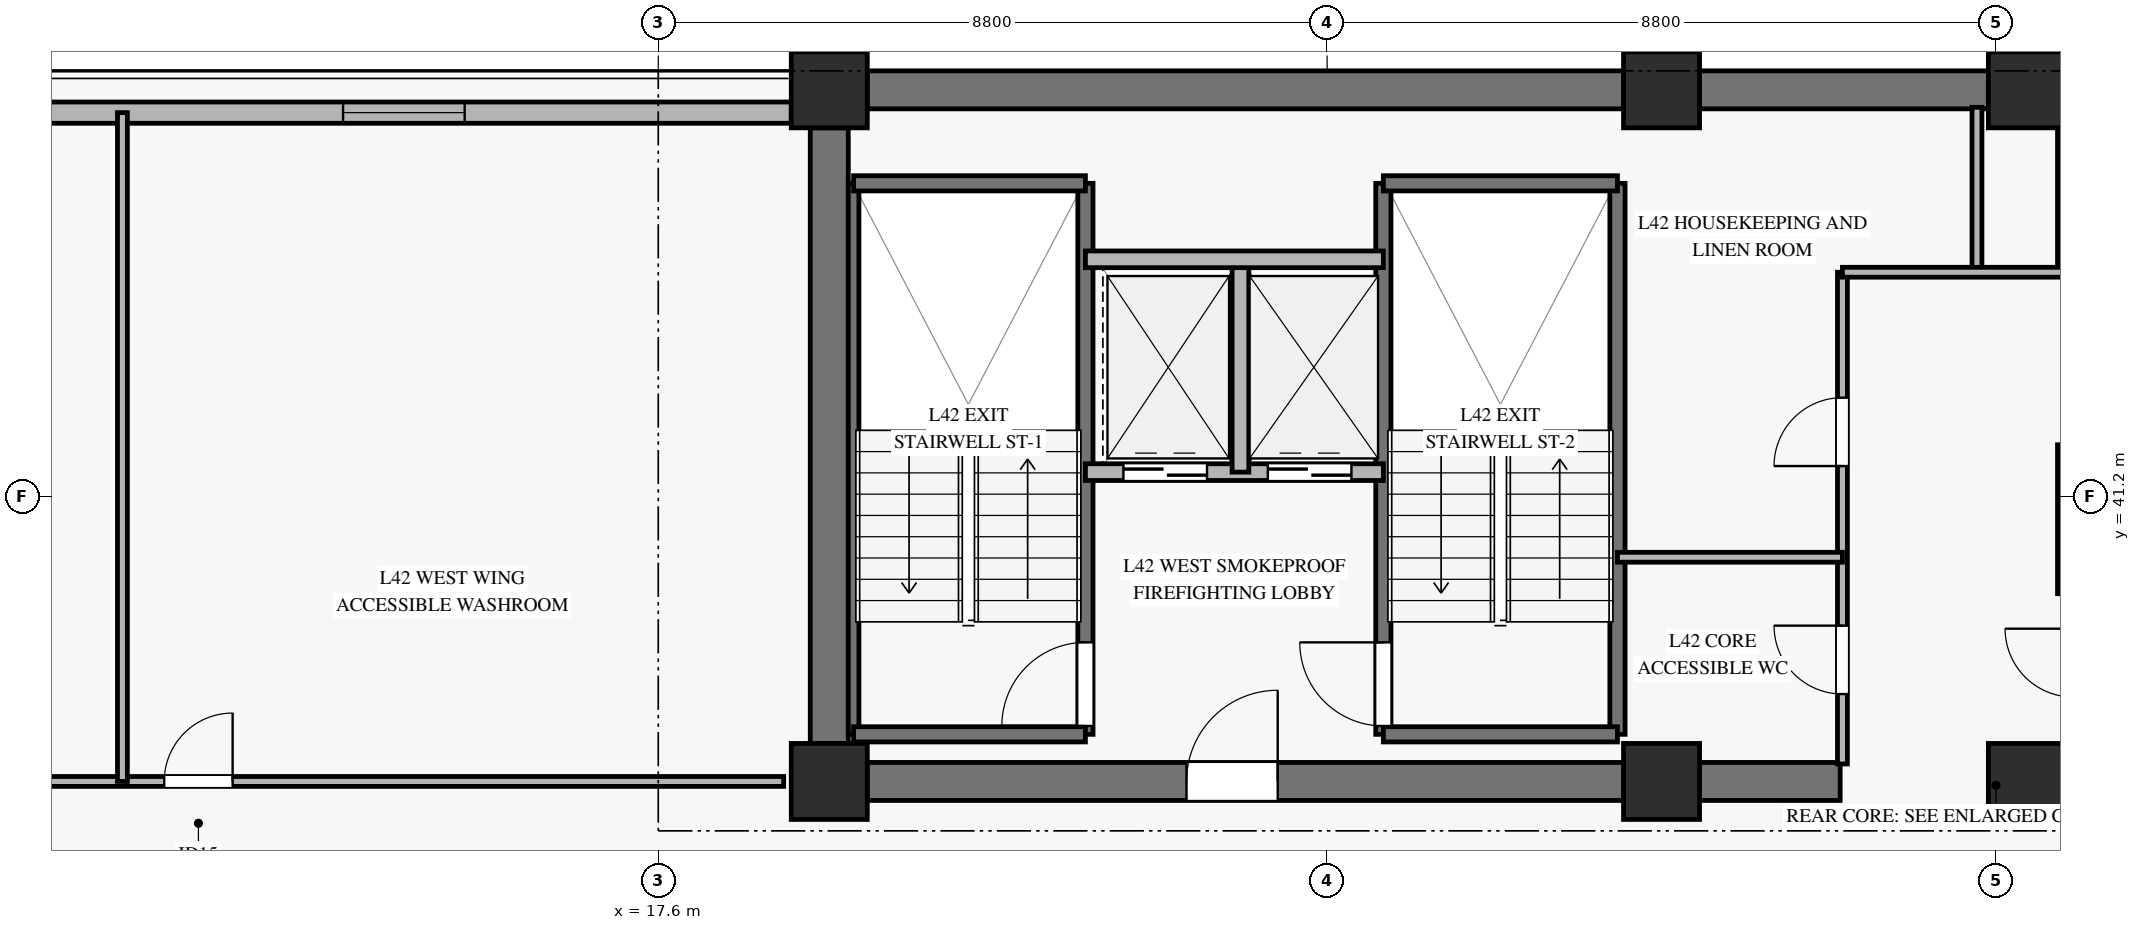
"""IFC4 building model, lengths in metres.
Left out: names, types, materials, properties, quantities, classifications, styles, units other than length and angle.
Written with IfcOpenShell. Run it as: python <this file> out.ifc"""

import sys

from ifc_helpers import new_model, si_unit, direction, frame, frame_2d, origin, origin_2d, place, context, subcontext, project, spatial, rectangle, extrude, source, transform, mapped, element, fill, save


model = new_model("IFC4")
c1 = context("Model", 3, precision=1e-05, world=origin(), true_north=direction((0.0, 1.0)))
c2 = subcontext(c1, "Body", "Model", "MODEL_VIEW")
j1 = project(units=[si_unit("LENGTHUNIT", "METRE"), si_unit("PLANEANGLEUNIT", "RADIAN")], contexts=[c1])
p1 = place(None, origin())
s1 = spatial("IfcSite", under=j1, at=p1, CompositionType="ELEMENT")
p2 = place(p1, origin())
s2 = spatial("IfcBuilding", under=s1, at=p2, CompositionType="ELEMENT")
p3 = place(p2, frame((0.0, 0.0, 170.2)))
s3 = spatial("IfcBuildingStorey", under=s2, at=p3, CompositionType="ELEMENT", Elevation=170.2)
m1 = source(origin(), c2, "Body", "SweptSolid", [
    extrude(rectangle(XDim=1.0, YDim=1.0, at=origin_2d()), origin(), (0.0, 0.0, 1.0), 3.27),
])
for number, where, z_axis, x_axis in (
    (1, (19.85, 37.45, 0.0), (0.0, 0.0, 1.0), (1.0, 0.0, 0.0)),
    (2, (19.85, 46.55, 0.0), (0.0, 0.0, 1.0), (1.0, 0.0, 0.0)),
    (3, (30.8, 37.45, 0.0), (0.0, 0.0, 1.0), (1.0, 0.0, 0.0)),
    (4, (30.8, 46.55, 0.0), (0.0, 0.0, 1.0), (1.0, 0.0, 0.0)),
    (5, (35.6, 37.45, 0.0), (0.0, 0.0, 1.0), (1.0, 0.0, 0.0)),
    (6, (35.6, 46.55, 0.0), (0.0, 0.0, 1.0), (1.0, 0.0, 0.0)),
):
    element("IfcColumn", number, at=place(p3, frame(where, z_axis=z_axis, x_axis=x_axis)), inside=s3, PredefinedType="PILASTER", context=c2, shape_type="MappedRepresentation", body=[
        mapped(m1, transform((0.0, 0.0, 0.0), x_axis=(1.0, 0.0, 0.0), y_axis=(0.0, 1.0, 0.0), z_axis=(0.0, 0.0, 1.0), scale=1.0)),
    ])
p4 = place(p3, frame((20.35, 46.55, 0.0), z_axis=(0.0, 0.0, 1.0), x_axis=(1.0, 0.0, 0.0)))
e7 = element("IfcWall", 7, at=p4, inside=s3, PredefinedType="SHEAR", context=c2, shape_type="SweptSolid", body=[
    extrude(rectangle(XDim=9.95, YDim=0.5, at=frame_2d((4.975, 0.0))), origin(), (0.0, 0.0, 1.0), 3.27),
])
p5 = place(p3, frame((31.3, 46.55, 0.0), z_axis=(0.0, 0.0, 1.0), x_axis=(1.0, 0.0, 0.0)))
e8 = element("IfcWall", 8, at=p5, inside=s3, PredefinedType="SHEAR", context=c2, shape_type="SweptSolid", body=[
    extrude(rectangle(XDim=3.8, YDim=0.5, at=frame_2d((1.9, 0.0))), origin(), (0.0, 0.0, 1.0), 3.27),
])
p6 = place(p3, frame((20.35, 37.45, 0.0), z_axis=(0.0, 0.0, 1.0), x_axis=(1.0, 0.0, 0.0)))
e9 = element("IfcWall", 9, at=p6, inside=s3, PredefinedType="SHEAR", context=c2, shape_type="SweptSolid", body=[
    extrude(rectangle(XDim=9.95, YDim=0.5, at=frame_2d((4.975, 0.0))), origin(), (0.0, 0.0, 1.0), 3.27),
])
p7 = place(p6, frame((4.2, 0.0, 0.0)))
e10 = element("IfcOpeningElement", 10, at=p7, cuts=e9, PredefinedType="OPENING", context=c2, shape_type="SweptSolid", body=[
    extrude(rectangle(XDim=1.2, YDim=2.15, at=frame_2d((0.6, 1.075))), frame((0.0, 0.26, 0.0), z_axis=(0.0, -1.0, 0.0), x_axis=(1.0, 0.0, 0.0)), (0.0, 0.0, 1.0), 0.52),
])
p8 = place(p3, frame((31.3, 37.45, 0.0), z_axis=(0.0, 0.0, 1.0), x_axis=(1.0, 0.0, 0.0)))
e11 = element("IfcWall", 11, at=p8, inside=s3, PredefinedType="SHEAR", context=c2, shape_type="SweptSolid", body=[
    extrude(rectangle(XDim=1.85, YDim=0.5, at=frame_2d((0.925, 0.0))), origin(), (0.0, 0.0, 1.0), 3.27),
])
p9 = place(p3, frame((19.85, 37.95, 0.0), z_axis=(0.0, 0.0, 1.0), x_axis=(0.0, 1.0, 0.0)))
e12 = element("IfcWall", 12, at=p9, inside=s3, PredefinedType="SHEAR", context=c2, shape_type="SweptSolid", body=[
    extrude(rectangle(XDim=8.1, YDim=0.5, at=frame_2d((4.05, 0.0))), origin(), (0.0, 0.0, 1.0), 3.27),
])
p10 = place(p3, frame((9.156, 46.25, 0.0), z_axis=(0.0, 0.0, 1.0), x_axis=(1.0, 0.0, 0.0)))
e13 = element("IfcWall", 13, at=p10, inside=s3, PredefinedType="SOLIDWALL", context=c2, shape_type="SweptSolid", body=[
    extrude(rectangle(XDim=10.194, YDim=0.28, at=frame_2d((5.097, 0.0))), origin(), (0.0, 0.0, 1.0), 2.75),
])
p11 = place(p10, frame((4.297, 0.0, 0.45)))
e14 = element("IfcOpeningElement", 14, at=p11, cuts=e13, PredefinedType="OPENING", context=c2, shape_type="SweptSolid", body=[
    extrude(rectangle(XDim=1.6, YDim=2.0, at=frame_2d((0.8, 1.0))), frame((0.0, 0.15, 0.0), z_axis=(0.0, -1.0, 0.0), x_axis=(1.0, 0.0, 0.0)), (0.0, 0.0, 1.0), 0.3),
])
p12 = place(p3, frame((20.17, 38.07, 0.0), z_axis=(0.0, 0.0, 1.0), x_axis=(0.0, 1.0, 0.0)))
e15 = element("IfcWall", 15, at=p12, inside=s3, PredefinedType="SOLIDWALL", context=c2, shape_type="SweptSolid", body=[
    extrude(rectangle(XDim=7.25, YDim=0.14, at=frame_2d((3.625, 0.0))), origin(), (0.0, 0.0, 1.0), 3.5),
])
p13 = place(p3, frame((23.22, 38.07, 0.0), z_axis=(0.0, 0.0, 1.0), x_axis=(0.0, 1.0, 0.0)))
e16 = element("IfcWall", 16, at=p13, inside=s3, PredefinedType="SOLIDWALL", context=c2, shape_type="SweptSolid", body=[
    extrude(rectangle(XDim=7.25, YDim=0.2, at=frame_2d((3.625, 0.0))), origin(), (0.0, 0.0, 1.0), 3.5),
])
p14 = place(p13, frame((0.11, 0.0, 0.0)))
e17 = element("IfcOpeningElement", 17, at=p14, cuts=e16, PredefinedType="OPENING", context=c2, shape_type="SweptSolid", body=[
    extrude(rectangle(XDim=1.1, YDim=2.15, at=frame_2d((0.55, 1.075))), frame((0.0, 0.11, 0.0), z_axis=(0.0, -1.0, 0.0), x_axis=(1.0, 0.0, 0.0)), (0.0, 0.0, 1.0), 0.22),
])
for number, where, z_axis, x_axis in (
    (18, (20.17, 45.32, 0.0), (0.0, 0.0, 1.0), (1.0, 0.0, 0.0)),
    (19, (20.17, 38.07, 0.0), (0.0, 0.0, 1.0), (1.0, 0.0, 0.0)),
):
    element("IfcWall", number, at=place(p3, frame(where, z_axis=z_axis, x_axis=x_axis)), inside=s3, PredefinedType="SOLIDWALL", context=c2, shape_type="SweptSolid", body=[
        extrude(rectangle(XDim=3.05, YDim=0.2, at=frame_2d((1.525, 0.0))), origin(), (0.0, 0.0, 1.0), 3.5),
    ])
p15 = place(p3, frame((27.14, 38.07, 0.0), z_axis=(0.0, 0.0, 1.0), x_axis=(0.0, 1.0, 0.0)))
e20 = element("IfcWall", 20, at=p15, inside=s3, PredefinedType="SOLIDWALL", context=c2, shape_type="SweptSolid", body=[
    extrude(rectangle(XDim=7.25, YDim=0.2, at=frame_2d((3.625, 0.0))), origin(), (0.0, 0.0, 1.0), 3.5),
])
p16 = place(p15, frame((0.11, 0.0, 0.0)))
e21 = element("IfcOpeningElement", 21, at=p16, cuts=e20, PredefinedType="OPENING", context=c2, shape_type="SweptSolid", body=[
    extrude(rectangle(XDim=1.1, YDim=2.15, at=frame_2d((0.55, 1.075))), frame((0.0, 0.11, 0.0), z_axis=(0.0, -1.0, 0.0), x_axis=(1.0, 0.0, 0.0)), (0.0, 0.0, 1.0), 0.22),
])
p17 = place(p3, frame((30.22, 38.07, 0.0), z_axis=(0.0, 0.0, 1.0), x_axis=(0.0, 1.0, 0.0)))
e22 = element("IfcWall", 22, at=p17, inside=s3, PredefinedType="SOLIDWALL", context=c2, shape_type="SweptSolid", body=[
    extrude(rectangle(XDim=7.25, YDim=0.2, at=frame_2d((3.625, 0.0))), origin(), (0.0, 0.0, 1.0), 3.5),
])
for number, where, z_axis, x_axis in (
    (23, (27.14, 45.32, 0.0), (0.0, 0.0, 1.0), (1.0, 0.0, 0.0)),
    (24, (27.14, 38.07, 0.0), (0.0, 0.0, 1.0), (1.0, 0.0, 0.0)),
):
    element("IfcWall", number, at=place(p3, frame(where, z_axis=z_axis, x_axis=x_axis)), inside=s3, PredefinedType="SOLIDWALL", context=c2, shape_type="SweptSolid", body=[
        extrude(rectangle(XDim=3.08, YDim=0.2, at=frame_2d((1.54, 0.0))), origin(), (0.0, 0.0, 1.0), 3.5),
    ])
p18 = place(p3, frame((23.22, 41.52, 0.0), z_axis=(0.0, 0.0, 1.0), x_axis=(1.0, 0.0, 0.0)))
e25 = element("IfcWall", 25, at=p18, inside=s3, PredefinedType="SOLIDWALL", context=c2, shape_type="SweptSolid", body=[
    extrude(rectangle(XDim=3.92, YDim=0.22, at=frame_2d((1.96, 0.0))), origin(), (0.0, 0.0, 1.0), 3.27),
])
p19 = place(p18, frame((0.5, 0.0, 0.0)))
e26 = element("IfcOpeningElement", 26, at=p19, cuts=e25, PredefinedType="OPENING", context=c2, shape_type="SweptSolid", body=[
    extrude(rectangle(XDim=1.1, YDim=2.2, at=frame_2d((0.55, 1.1))), frame((0.0, 0.12, 0.0), z_axis=(0.0, -1.0, 0.0), x_axis=(1.0, 0.0, 0.0)), (0.0, 0.0, 1.0), 0.24),
])
p20 = place(p18, frame((2.4, 0.0, 0.0)))
e27 = element("IfcOpeningElement", 27, at=p20, cuts=e25, PredefinedType="OPENING", context=c2, shape_type="SweptSolid", body=[
    extrude(rectangle(XDim=1.1, YDim=2.2, at=frame_2d((0.55, 1.1))), frame((0.0, 0.12, 0.0), z_axis=(0.0, -1.0, 0.0), x_axis=(1.0, 0.0, 0.0)), (0.0, 0.0, 1.0), 0.24),
])
p21 = place(p3, frame((25.26, 41.52, 0.0), z_axis=(0.0, 0.0, 1.0), x_axis=(0.0, 1.0, 0.0)))
e28 = element("IfcWall", 28, at=p21, inside=s3, PredefinedType="SOLIDWALL", context=c2, shape_type="SweptSolid", body=[
    extrude(rectangle(XDim=2.8, YDim=0.22, at=frame_2d((1.4, 0.0))), origin(), (0.0, 0.0, 1.0), 3.27),
])
p22 = place(p3, frame((23.22, 44.32, 0.0), z_axis=(0.0, 0.0, 1.0), x_axis=(1.0, 0.0, 0.0)))
e29 = element("IfcWall", 29, at=p22, inside=s3, PredefinedType="SOLIDWALL", context=c2, shape_type="SweptSolid", body=[
    extrude(rectangle(XDim=3.92, YDim=0.22, at=frame_2d((1.96, 0.0))), origin(), (0.0, 0.0, 1.0), 3.27),
])
p23 = place(p3, frame((36.12, 39.92, 0.0), z_axis=(0.0, 0.0, 1.0), x_axis=(0.0, 1.0, 0.0)))
e30 = element("IfcWall", 30, at=p23, inside=s3, PredefinedType="SOLIDWALL", context=c2, shape_type="SweptSolid", body=[
    extrude(rectangle(XDim=1.96, YDim=0.22, at=frame_2d((0.98, 0.0))), origin(), (0.0, 0.0, 1.0), 3.27),
])
p24 = place(p3, frame((36.12, 44.22, 0.0), z_axis=(0.0, 0.0, 1.0), x_axis=(0.0, 1.0, 0.0)))
e31 = element("IfcWall", 31, at=p24, inside=s3, PredefinedType="SOLIDWALL", context=c2, shape_type="SweptSolid", body=[
    extrude(rectangle(XDim=2.1, YDim=0.22, at=frame_2d((1.05, 0.0))), origin(), (0.0, 0.0, 1.0), 3.27),
])
p25 = place(p3, frame((33.18, 37.68, 0.0), z_axis=(0.0, 0.0, 1.0), x_axis=(0.0, 1.0, 0.0)))
e32 = element("IfcWall", 32, at=p25, inside=s3, PredefinedType="PARTITIONING", context=c2, shape_type="SweptSolid", body=[
    extrude(rectangle(XDim=6.47, YDim=0.13, at=frame_2d((3.235, 0.0))), origin(), (0.0, 0.0, 1.0), 2.355),
])
p26 = place(p25, frame((0.92, 0.0, 0.0)))
e33 = element("IfcOpeningElement", 33, at=p26, cuts=e32, PredefinedType="OPENING", context=c2, shape_type="SweptSolid", body=[
    extrude(rectangle(XDim=0.9, YDim=2.1, at=frame_2d((0.45, 1.05))), frame((0.0, 0.075, 0.0), z_axis=(0.0, -1.0, 0.0), x_axis=(1.0, 0.0, 0.0)), (0.0, 0.0, 1.0), 0.15),
])
p27 = place(p25, frame((3.92, 0.0, 0.0)))
e34 = element("IfcOpeningElement", 34, at=p27, cuts=e32, PredefinedType="OPENING", context=c2, shape_type="SweptSolid", body=[
    extrude(rectangle(XDim=0.9, YDim=2.1, at=frame_2d((0.45, 1.05))), frame((0.0, 0.075, 0.0), z_axis=(0.0, -1.0, 0.0), x_axis=(1.0, 0.0, 0.0)), (0.0, 0.0, 1.0), 0.15),
])
p28 = place(p3, frame((34.95, 44.15, 0.0), z_axis=(0.0, 0.0, 1.0), x_axis=(0.0, 1.0, 0.0)))
e35 = element("IfcWall", 35, at=p28, inside=s3, PredefinedType="PARTITIONING", context=c2, shape_type="SweptSolid", body=[
    extrude(rectangle(XDim=2.17, YDim=0.13, at=frame_2d((1.085, 0.0))), origin(), (0.0, 0.0, 1.0), 3.27),
])
p29 = place(p3, frame((33.18, 44.15, 0.0), z_axis=(0.0, 0.0, 1.0), x_axis=(1.0, 0.0, 0.0)))
e36 = element("IfcWall", 36, at=p29, inside=s3, PredefinedType="PARTITIONING", context=c2, shape_type="SweptSolid", body=[
    extrude(rectangle(XDim=2.97, YDim=0.13, at=frame_2d((1.485, 0.0))), origin(), (0.0, 0.0, 1.0), 2.555),
])
p30 = place(p3, frame((30.22, 40.4, 0.0), z_axis=(0.0, 0.0, 1.0), x_axis=(1.0, 0.0, 0.0)))
e37 = element("IfcWall", 37, at=p30, inside=s3, PredefinedType="PARTITIONING", context=c2, shape_type="SweptSolid", body=[
    extrude(rectangle(XDim=2.96, YDim=0.13, at=frame_2d((1.48, 0.0))), origin(), (0.0, 0.0, 1.0), 2.555),
])
p31 = place(p3, frame((5.919, 37.45, 0.0), z_axis=(0.0, 0.0, 1.0), x_axis=(1.0, 0.0, 0.0)))
e38 = element("IfcWall", 38, at=p31, inside=s3, PredefinedType="PARTITIONING", context=c2, shape_type="SweptSolid", body=[
    extrude(rectangle(XDim=13.331, YDim=0.13, at=frame_2d((6.666, 0.0))), origin(), (0.0, 0.0, 1.0), 2.755),
])
p32 = place(p31, frame((0.9, 0.0, 0.0)))
e39 = element("IfcOpeningElement", 39, at=p32, cuts=e38, PredefinedType="OPENING", context=c2, shape_type="SweptSolid", body=[
    extrude(rectangle(XDim=0.95, YDim=2.1, at=frame_2d((0.475, 1.05))), frame((0.0, 0.075, 0.0), z_axis=(0.0, -1.0, 0.0), x_axis=(1.0, 0.0, 0.0)), (0.0, 0.0, 1.0), 0.15),
])
p33 = place(p31, frame((5.181, 0.0, 0.0)))
e40 = element("IfcOpeningElement", 40, at=p33, cuts=e38, PredefinedType="OPENING", context=c2, shape_type="SweptSolid", body=[
    extrude(rectangle(XDim=0.9, YDim=2.1, at=frame_2d((0.45, 1.05))), frame((0.0, 0.075, 0.0), z_axis=(0.0, -1.0, 0.0), x_axis=(1.0, 0.0, 0.0)), (0.0, 0.0, 1.0), 0.15),
])
p34 = place(p3, frame((10.55, 37.45, 0.0), z_axis=(0.0, 0.0, 1.0), x_axis=(0.0, 1.0, 0.0)))
e41 = element("IfcWall", 41, at=p34, inside=s3, PredefinedType="PARTITIONING", context=c2, shape_type="SweptSolid", body=[
    extrude(rectangle(XDim=8.8, YDim=0.13, at=frame_2d((4.4, 0.0))), origin(), (0.0, 0.0, 1.0), 3.27),
])
m2 = source(origin(), c2, "Body", "SweptSolid", [
    extrude(rectangle(XDim=1.6, YDim=2.0, at=frame_2d((0.8, 1.0))), frame((0.0, 0.03, 0.0), z_axis=(0.0, -1.0, 0.0), x_axis=(1.0, 0.0, 0.0)), (0.0, 0.0, 1.0), 0.06),
])
p35 = place(p11, origin())
e42 = element("IfcWindow", 42, at=p35, inside=s3, PartitioningType="SINGLE_PANEL", PredefinedType="WINDOW", context=c2, shape_type="MappedRepresentation", body=[
    mapped(m2, transform((0.0, 0.0, 0.0), x_axis=(1.0, 0.0, 0.0), y_axis=(0.0, 1.0, 0.0), z_axis=(0.0, 0.0, 1.0), scale=1.0)),
])
fill(e14, e42)
m3 = source(origin(), c2, "Body", "SweptSolid", [
    extrude(rectangle(XDim=1.1, YDim=2.15, at=frame_2d((0.55, 1.075))), frame((0.0, 0.025, 0.0), z_axis=(0.0, -1.0, 0.0), x_axis=(1.0, 0.0, 0.0)), (0.0, 0.0, 1.0), 0.05),
])
p36 = place(p14, origin())
e43 = element("IfcDoor", 43, at=p36, inside=s3, OperationType="SINGLE_SWING_LEFT", PredefinedType="DOOR", context=c2, shape_type="MappedRepresentation", body=[
    mapped(m3, transform((0.0, 0.0, 0.0), x_axis=(1.0, 0.0, 0.0), y_axis=(0.0, 1.0, 0.0), z_axis=(0.0, 0.0, 1.0), scale=1.0)),
])
fill(e17, e43)
p37 = place(p16, origin())
e44 = element("IfcDoor", 44, at=p37, inside=s3, OperationType="SINGLE_SWING_RIGHT", PredefinedType="DOOR", context=c2, shape_type="MappedRepresentation", body=[
    mapped(m3, transform((0.0, 0.0, 0.0), x_axis=(1.0, 0.0, 0.0), y_axis=(0.0, 1.0, 0.0), z_axis=(0.0, 0.0, 1.0), scale=1.0)),
])
fill(e21, e44)
m4 = source(origin(), c2, "Body", "SweptSolid", [
    extrude(rectangle(XDim=1.1, YDim=2.2, at=frame_2d((0.55, 1.1))), frame((0.0, 0.025, 0.0), z_axis=(0.0, -1.0, 0.0), x_axis=(1.0, 0.0, 0.0)), (0.0, 0.0, 1.0), 0.05),
])
p38 = place(p19, origin())
e45 = element("IfcDoor", 45, at=p38, inside=s3, OperationType="SLIDING_TO_LEFT", PredefinedType="DOOR", context=c2, shape_type="MappedRepresentation", body=[
    mapped(m4, transform((0.0, 0.0, 0.0), x_axis=(1.0, 0.0, 0.0), y_axis=(0.0, 1.0, 0.0), z_axis=(0.0, 0.0, 1.0), scale=1.0)),
])
fill(e26, e45)
p39 = place(p20, origin())
e46 = element("IfcDoor", 46, at=p39, inside=s3, OperationType="SLIDING_TO_LEFT", PredefinedType="DOOR", context=c2, shape_type="MappedRepresentation", body=[
    mapped(m4, transform((0.0, 0.0, 0.0), x_axis=(1.0, 0.0, 0.0), y_axis=(0.0, 1.0, 0.0), z_axis=(0.0, 0.0, 1.0), scale=1.0)),
])
fill(e27, e46)
m5 = source(origin(), c2, "Body", "SweptSolid", [
    extrude(rectangle(XDim=1.2, YDim=2.15, at=frame_2d((0.6, 1.075))), frame((0.0, 0.025, 0.0), z_axis=(0.0, -1.0, 0.0), x_axis=(1.0, 0.0, 0.0)), (0.0, 0.0, 1.0), 0.05),
])
p40 = place(p7, origin())
e47 = element("IfcDoor", 47, at=p40, inside=s3, OperationType="SINGLE_SWING_RIGHT", PredefinedType="DOOR", context=c2, shape_type="MappedRepresentation", body=[
    mapped(m5, transform((0.0, 0.0, 0.0), x_axis=(1.0, 0.0, 0.0), y_axis=(0.0, 1.0, 0.0), z_axis=(0.0, 0.0, 1.0), scale=1.0)),
])
fill(e10, e47)
m6 = source(origin(), c2, "Body", "SweptSolid", [
    extrude(rectangle(XDim=0.9, YDim=2.1, at=frame_2d((0.45, 1.05))), frame((0.0, 0.025, 0.0), z_axis=(0.0, -1.0, 0.0), x_axis=(1.0, 0.0, 0.0)), (0.0, 0.0, 1.0), 0.05),
])
p41 = place(p26, origin())
e48 = element("IfcDoor", 48, at=p41, inside=s3, OperationType="SINGLE_SWING_RIGHT", PredefinedType="DOOR", context=c2, shape_type="MappedRepresentation", body=[
    mapped(m6, transform((0.0, 0.0, 0.0), x_axis=(1.0, 0.0, 0.0), y_axis=(0.0, 1.0, 0.0), z_axis=(0.0, 0.0, 1.0), scale=1.0)),
])
fill(e33, e48)
p42 = place(p27, origin())
e49 = element("IfcDoor", 49, at=p42, inside=s3, OperationType="SINGLE_SWING_LEFT", PredefinedType="DOOR", context=c2, shape_type="MappedRepresentation", body=[
    mapped(m6, transform((0.0, 0.0, 0.0), x_axis=(1.0, 0.0, 0.0), y_axis=(0.0, 1.0, 0.0), z_axis=(0.0, 0.0, 1.0), scale=1.0)),
])
fill(e34, e49)
p43 = place(p33, origin())
e50 = element("IfcDoor", 50, at=p43, inside=s3, OperationType="SINGLE_SWING_RIGHT", PredefinedType="DOOR", context=c2, shape_type="MappedRepresentation", body=[
    mapped(m6, transform((0.0, 0.0, 0.0), x_axis=(1.0, 0.0, 0.0), y_axis=(0.0, 1.0, 0.0), z_axis=(0.0, 0.0, 1.0), scale=1.0)),
])
fill(e40, e50)
save(model, sys.argv[1])
